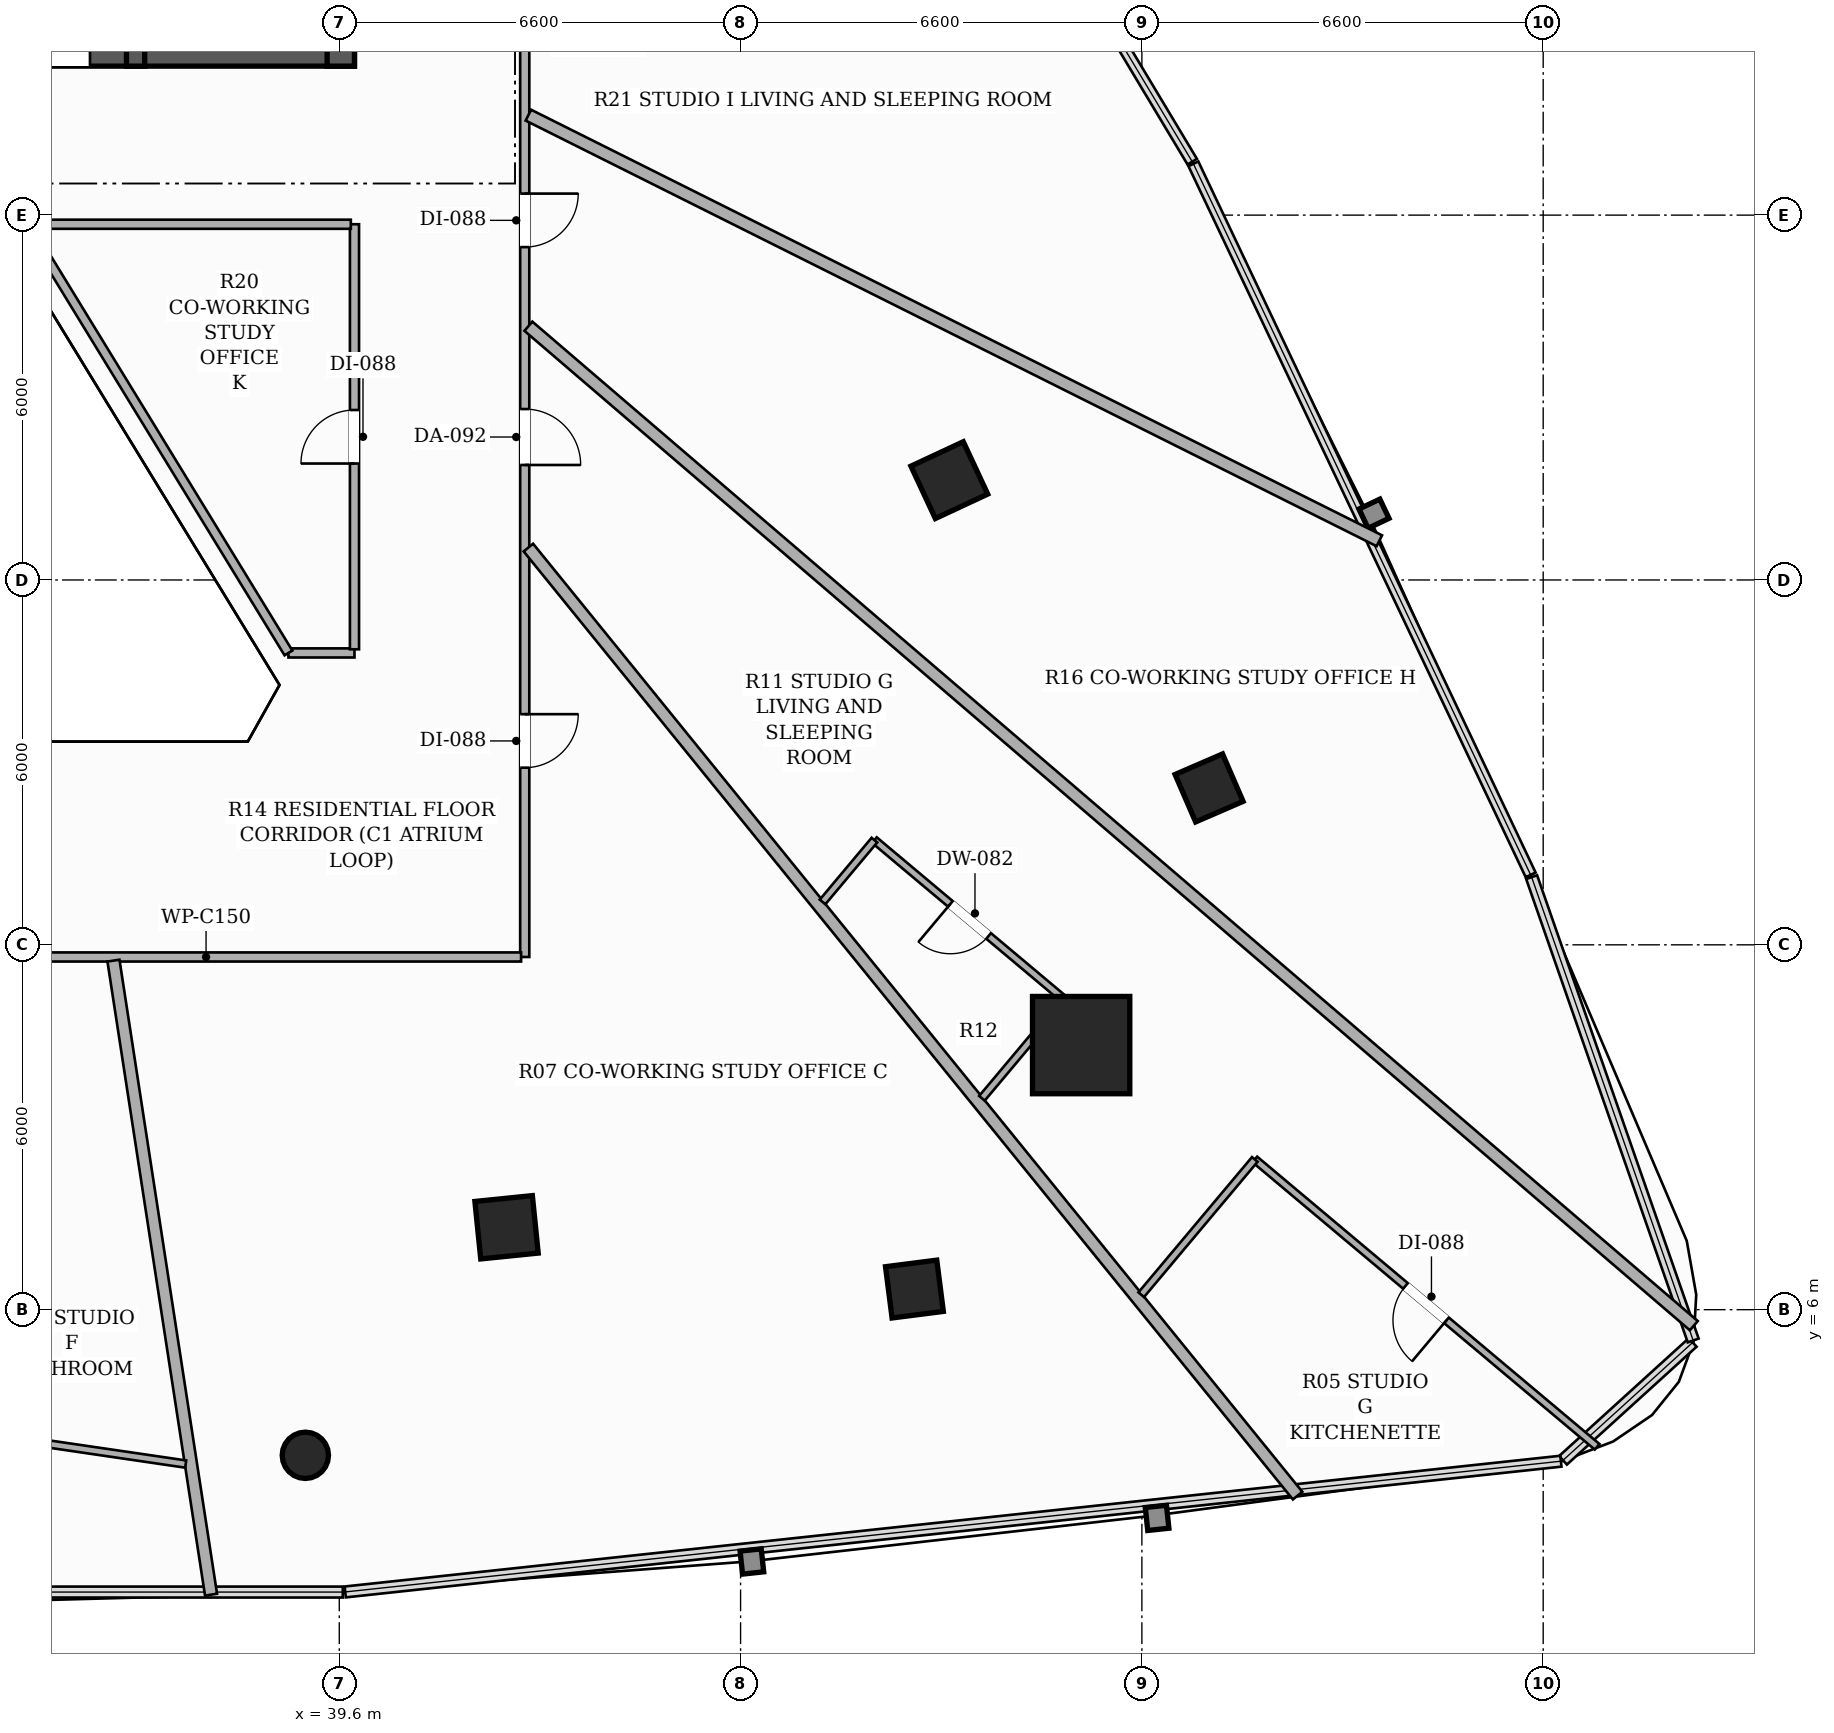
"""IFC4 building model, lengths in metres.
Left out: names, types, materials, properties, quantities, classifications, styles, units other than length and angle.
Written with IfcOpenShell. Run it as: python <this file> out.ifc"""

import sys

from ifc_helpers import new_model, si_unit, direction, frame, frame_2d, origin, origin_2d, place, context, subcontext, project, spatial, rectangle, hollow_rectangle, hollow_circle, extrude, element, fill, save


model = new_model("IFC4")
c1 = context("Model", 3, precision=1e-05, world=origin(), true_north=direction((0.0, 1.0)))
c2 = subcontext(c1, "Body", "Model", "MODEL_VIEW")
j1 = project(units=[si_unit("LENGTHUNIT", "METRE"), si_unit("PLANEANGLEUNIT", "RADIAN")], contexts=[c1])
p1 = place(None, origin())
s1 = spatial("IfcSite", under=j1, at=p1, CompositionType="ELEMENT")
p2 = place(p1, origin())
s2 = spatial("IfcBuilding", under=s1, at=p2, CompositionType="ELEMENT")
p3 = place(p2, frame((0.0, 0.0, 40.1)))
s3 = spatial("IfcBuildingStorey", under=s2, at=p3, CompositionType="ELEMENT", Elevation=40.1)
p4 = place(p3, frame((26.15, 26.675, 0.0), z_axis=(0.0, 0.0, 1.0), x_axis=(1.0, 0.0, 0.0)))
e1 = element("IfcWall", 1, at=p4, inside=s3, PredefinedType="SHEAR", context=c2, shape_type="SweptSolid", body=[
    extrude(rectangle(XDim=13.7, YDim=0.45, at=frame_2d((6.85, 0.0))), origin(), (0.0, 0.0, 1.0), 3.3),
])
p5 = place(p4, frame((4.35, 0.0, 0.0)))
e2 = element("IfcOpeningElement", 2, at=p5, cuts=e1, PredefinedType="OPENING", context=c2, shape_type="SweptSolid", body=[
    extrude(rectangle(XDim=1.05, YDim=2.15, at=frame_2d((0.525, 1.075))), frame((0.0, 0.235, 0.0), z_axis=(0.0, -1.0, 0.0), x_axis=(1.0, 0.0, 0.0)), (0.0, 0.0, 1.0), 0.47),
])
p6 = place(p4, frame((8.3, 0.0, 0.0)))
e3 = element("IfcOpeningElement", 3, at=p6, cuts=e1, PredefinedType="OPENING", context=c2, shape_type="SweptSolid", body=[
    extrude(rectangle(XDim=1.05, YDim=2.15, at=frame_2d((0.525, 1.075))), frame((0.0, 0.235, 0.0), z_axis=(0.0, -1.0, 0.0), x_axis=(1.0, 0.0, 0.0)), (0.0, 0.0, 1.0), 0.47),
])
p7 = place(p3, frame((39.625, 26.45, 0.0), z_axis=(0.0, 0.0, 1.0), x_axis=(0.0, 1.0, 0.0)))
e4 = element("IfcWall", 4, at=p7, inside=s3, PredefinedType="SHEAR", context=c2, shape_type="SweptSolid", body=[
    extrude(rectangle(XDim=7.7, YDim=0.45, at=frame_2d((3.85, 0.0))), origin(), (0.0, 0.0, 1.0), 3.3),
])
p8 = place(p3, frame((36.25, 26.45, 0.0), z_axis=(0.0, 0.0, 1.0), x_axis=(0.0, 1.0, 0.0)))
e5 = element("IfcWall", 5, at=p8, inside=s3, PredefinedType="SHEAR", context=c2, shape_type="SweptSolid", body=[
    extrude(rectangle(XDim=8.2, YDim=0.3, at=frame_2d((4.1, 0.0))), origin(), (0.0, 0.0, 1.0), 3.3),
])
p9 = place(p8, frame((0.6, 0.0, 0.0)))
e6 = element("IfcOpeningElement", 6, at=p9, cuts=e5, PredefinedType="OPENING", context=c2, shape_type="SweptSolid", body=[
    extrude(rectangle(XDim=1.05, YDim=2.15, at=frame_2d((0.525, 1.075))), frame((0.0, 0.16, 0.0), z_axis=(0.0, -1.0, 0.0), x_axis=(1.0, 0.0, 0.0)), (0.0, 0.0, 1.0), 0.32),
])
p10 = place(p3, frame((51.801, 10.351, 0.0), z_axis=(0.0, 0.0, 1.0), x_axis=(1.0, 0.0, 0.0)))
e7 = element("IfcColumn", 7, at=p10, inside=s3, PredefinedType="COLUMN", context=c2, shape_type="SweptSolid", body=[
    extrude(hollow_rectangle(XDim=1.6, YDim=1.6, WallThickness=0.05, at=origin_2d()), origin(), (0.0, 0.0, 1.0), 3.3),
])
for number, where, z_axis, x_axis in (
    (8, (42.351, 7.355, 0.0), (0.0, 0.0, 1.0), (0.995, 0.101, 0.0)),
    (9, (49.633, 19.642, 0.0), (0.0, 0.0, 1.0), (-0.423, 0.906, 0.0)),
):
    element("IfcColumn", number, at=place(p3, frame(where, z_axis=z_axis, x_axis=x_axis)), inside=s3, PredefinedType="COLUMN", context=c2, shape_type="SweptSolid", body=[
        extrude(hollow_rectangle(XDim=0.95, YDim=0.95, WallThickness=0.032, at=origin_2d()), origin(), (0.0, 0.0, 1.0), 3.3),
    ])
for number, where, z_axis, x_axis in (
    (10, (49.059, 6.339, 0.0), (0.0, 0.0, 1.0), (0.992, 0.127, 0.0)),
    (11, (53.905, 14.58, 0.0), (0.0, 0.0, 1.0), (-0.397, 0.918, 0.0)),
):
    element("IfcColumn", number, at=place(p3, frame(where, z_axis=z_axis, x_axis=x_axis)), inside=s3, PredefinedType="COLUMN", context=c2, shape_type="SweptSolid", body=[
        extrude(hollow_rectangle(XDim=0.85, YDim=0.85, WallThickness=0.028, at=origin_2d()), origin(), (0.0, 0.0, 1.0), 3.3),
    ])
p11 = place(p3, frame((39.042, 3.605, 0.0), z_axis=(0.0, 0.0, 1.0), x_axis=(1.0, 0.0, 0.0)))
e12 = element("IfcColumn", 12, at=p11, inside=s3, PredefinedType="COLUMN", context=c2, shape_type="SweptSolid", body=[
    extrude(hollow_circle(Radius=0.381, WallThickness=0.022, at=origin_2d()), origin(), (0.0, 0.0, 1.0), 3.3),
])
p12 = place(p3, frame((42.65, 36.84, 0.0), z_axis=(0.0, 0.0, 1.0), x_axis=(0.0, -1.0, 0.0)))
e13 = element("IfcWall", 13, at=p12, inside=s3, PredefinedType="PARTITIONING", context=c2, shape_type="SweptSolid", body=[
    extrude(rectangle(XDim=25.04, YDim=0.15, at=frame_2d((12.52, 0.0))), origin(), (0.0, 0.0, 1.0), 2.413),
])
p13 = place(p12, frame((1.219, 0.0, 0.0)))
e14 = element("IfcOpeningElement", 14, at=p13, cuts=e13, PredefinedType="OPENING", context=c2, shape_type="SweptSolid", body=[
    extrude(rectangle(XDim=0.88, YDim=2.1, at=frame_2d((0.44, 1.05))), frame((0.0, 0.085, 0.0), z_axis=(0.0, -1.0, 0.0), x_axis=(1.0, 0.0, 0.0)), (0.0, 0.0, 1.0), 0.17),
])
p14 = place(p12, frame((21.047, 0.0, 0.0)))
e15 = element("IfcOpeningElement", 15, at=p14, cuts=e13, PredefinedType="OPENING", context=c2, shape_type="SweptSolid", body=[
    extrude(rectangle(XDim=0.88, YDim=2.1, at=frame_2d((0.44, 1.05))), frame((0.0, 0.085, 0.0), z_axis=(0.0, -1.0, 0.0), x_axis=(1.0, 0.0, 0.0)), (0.0, 0.0, 1.0), 0.17),
])
p15 = place(p12, frame((16.029, 0.0, 0.0)))
e16 = element("IfcOpeningElement", 16, at=p15, cuts=e13, PredefinedType="OPENING", context=c2, shape_type="SweptSolid", body=[
    extrude(rectangle(XDim=0.92, YDim=2.15, at=frame_2d((0.46, 1.075))), frame((0.0, 0.085, 0.0), z_axis=(0.0, -1.0, 0.0), x_axis=(1.0, 0.0, 0.0)), (0.0, 0.0, 1.0), 0.17),
])
p16 = place(p12, frame((12.486, 0.0, 0.0)))
e17 = element("IfcOpeningElement", 17, at=p16, cuts=e13, PredefinedType="OPENING", context=c2, shape_type="SweptSolid", body=[
    extrude(rectangle(XDim=0.88, YDim=2.1, at=frame_2d((0.44, 1.05))), frame((0.0, 0.085, 0.0), z_axis=(0.0, -1.0, 0.0), x_axis=(1.0, 0.0, 0.0)), (0.0, 0.0, 1.0), 0.17),
])
p17 = place(p12, frame((6.638, 0.0, 0.0)))
e18 = element("IfcOpeningElement", 18, at=p17, cuts=e13, PredefinedType="OPENING", context=c2, shape_type="SweptSolid", body=[
    extrude(rectangle(XDim=0.92, YDim=2.15, at=frame_2d((0.46, 1.075))), frame((0.0, 0.085, 0.0), z_axis=(0.0, -1.0, 0.0), x_axis=(1.0, 0.0, 0.0)), (0.0, 0.0, 1.0), 0.17),
])
p18 = place(p3, frame((42.59, 11.8, 0.0), z_axis=(0.0, 0.0, 1.0), x_axis=(-1.0, 0.0, 0.0)))
e19 = element("IfcWall", 19, at=p18, inside=s3, PredefinedType="PARTITIONING", context=c2, shape_type="SweptSolid", body=[
    extrude(rectangle(XDim=19.24, YDim=0.15, at=frame_2d((9.62, 0.0))), origin(), (0.0, 0.0, 1.0), 2.669),
])
p19 = place(p18, frame((10.462, 0.0, 0.0)))
e20 = element("IfcOpeningElement", 20, at=p19, cuts=e19, PredefinedType="OPENING", context=c2, shape_type="SweptSolid", body=[
    extrude(rectangle(XDim=0.92, YDim=2.15, at=frame_2d((0.46, 1.075))), frame((0.0, 0.085, 0.0), z_axis=(0.0, -1.0, 0.0), x_axis=(1.0, 0.0, 0.0)), (0.0, 0.0, 1.0), 0.17),
])
p20 = place(p3, frame((38.764, 16.8, 0.0), z_axis=(0.0, 0.0, 1.0), x_axis=(1.0, 0.0, 0.0)))
e21 = element("IfcWall", 21, at=p20, inside=s3, PredefinedType="PARTITIONING", context=c2, shape_type="SweptSolid", body=[
    extrude(rectangle(XDim=1.086, YDim=0.15, at=frame_2d((0.543, 0.0))), origin(), (0.0, 0.0, 1.0), 3.06),
])
p21 = place(p3, frame((39.85, 16.86, 0.0), z_axis=(0.0, 0.0, 1.0), x_axis=(0.0, 1.0, 0.0)))
e22 = element("IfcWall", 22, at=p21, inside=s3, PredefinedType="PARTITIONING", context=c2, shape_type="SweptSolid", body=[
    extrude(rectangle(XDim=6.99, YDim=0.15, at=frame_2d((3.495, 0.0))), origin(), (0.0, 0.0, 1.0), 2.669),
])
p22 = place(p21, frame((3.055, 0.0, 0.0)))
e23 = element("IfcOpeningElement", 23, at=p22, cuts=e22, PredefinedType="OPENING", context=c2, shape_type="SweptSolid", body=[
    extrude(rectangle(XDim=0.88, YDim=2.1, at=frame_2d((0.44, 1.05))), frame((0.0, 0.085, 0.0), z_axis=(0.0, -1.0, 0.0), x_axis=(1.0, 0.0, 0.0)), (0.0, 0.0, 1.0), 0.17),
])
p23 = place(p3, frame((39.79, 23.85, 0.0), z_axis=(0.0, 0.0, 1.0), x_axis=(-1.0, 0.0, 0.0)))
e24 = element("IfcWall", 24, at=p23, inside=s3, PredefinedType="PARTITIONING", context=c2, shape_type="SweptSolid", body=[
    extrude(rectangle(XDim=5.335, YDim=0.15, at=frame_2d((2.667, 0.0))), origin(), (0.0, 0.0, 1.0), 2.669),
])
p24 = place(p3, frame((34.486, 23.79, 0.0), z_axis=(0.0, 0.0, 1.0), x_axis=(0.521998190399, -0.852946592244, 0.0)))
e25 = element("IfcWall", 25, at=p24, inside=s3, PredefinedType="PARTITIONING", context=c2, shape_type="SweptSolid", body=[
    extrude(rectangle(XDim=8.195, YDim=0.15, at=frame_2d((4.098, 0.0))), origin(), (0.0, 0.0, 1.0), 2.669),
])
p25 = place(p3, frame((37.491, 1.313, 0.0), z_axis=(0.0, 0.0, 1.0), x_axis=(-0.152133698634, 0.988359923176, 0.0)))
e26 = element("IfcWall", 26, at=p25, inside=s3, PredefinedType="PARTITIONING", context=c2, shape_type="SweptSolid", body=[
    extrude(rectangle(XDim=10.55, YDim=0.2, at=frame_2d((5.275, 0.0))), origin(), (0.0, 0.0, 1.0), 2.413),
])
p26 = place(p3, frame((42.71, 18.533, 0.0), z_axis=(0.0, 0.0, 1.0), x_axis=(0.630093983448, -0.776518880661, 0.0)))
e27 = element("IfcWall", 27, at=p26, inside=s3, PredefinedType="PARTITIONING", context=c2, shape_type="SweptSolid", body=[
    extrude(rectangle(XDim=20.078, YDim=0.2, at=frame_2d((10.039, 0.0))), origin(), (0.0, 0.0, 1.0), 2.413),
])
p27 = place(p3, frame((42.71, 22.173, 0.0), z_axis=(0.0, 0.0, 1.0), x_axis=(0.759115981911, -0.650955394791, 0.0)))
e28 = element("IfcWall", 28, at=p27, inside=s3, PredefinedType="PARTITIONING", context=c2, shape_type="SweptSolid", body=[
    extrude(rectangle(XDim=25.249, YDim=0.2, at=frame_2d((12.625, 0.0))), origin(), (0.0, 0.0, 1.0), 2.413),
])
p28 = place(p3, frame((42.71, 25.644, 0.0), z_axis=(0.0, 0.0, 1.0), x_axis=(0.894389742198, -0.447288485265, 0.0)))
e29 = element("IfcWall", 29, at=p28, inside=s3, PredefinedType="PARTITIONING", context=c2, shape_type="SweptSolid", body=[
    extrude(rectangle(XDim=15.648, YDim=0.2, at=frame_2d((7.824, 0.0))), origin(), (0.0, 0.0, 1.0), 2.413),
])
p29 = place(p3, frame((33.321, 4.011, 0.0), z_axis=(0.0, 0.0, 1.0), x_axis=(0.98942932615, -0.145015890698, 0.0)))
e30 = element("IfcWall", 30, at=p29, inside=s3, PredefinedType="PARTITIONING", context=c2, shape_type="SweptSolid", body=[
    extrude(rectangle(XDim=3.793, YDim=0.12, at=frame_2d((1.896, 0.0))), origin(), (0.0, 0.0, 1.0), 3.06),
])
p30 = place(p3, frame((50.169, 9.476, 0.0), z_axis=(0.0, 0.0, 1.0), x_axis=(0.642802339764, 0.766032082875, 0.0)))
e31 = element("IfcWall", 31, at=p30, inside=s3, PredefinedType="PARTITIONING", context=c2, shape_type="SweptSolid", body=[
    extrude(rectangle(XDim=2.116, YDim=0.12, at=frame_2d((1.058, 0.0))), origin(), (0.0, 0.0, 1.0), 2.413),
])
p31 = place(p3, frame((51.529, 11.097, 0.0), z_axis=(0.0, 0.0, 1.0), x_axis=(-0.766026296222, 0.642809235696, 0.0)))
e32 = element("IfcWall", 32, at=p31, inside=s3, PredefinedType="PARTITIONING", context=c2, shape_type="SweptSolid", body=[
    extrude(rectangle(XDim=4.084, YDim=0.12, at=frame_2d((2.042, 0.0))), origin(), (0.0, 0.0, 1.0), 2.413),
])
p32 = place(p31, frame((1.632, 0.0, 0.0)))
e33 = element("IfcOpeningElement", 33, at=p32, cuts=e32, PredefinedType="OPENING", context=c2, shape_type="SweptSolid", body=[
    extrude(rectangle(XDim=0.82, YDim=2.1, at=frame_2d((0.41, 1.05))), frame((0.0, 0.07, 0.0), z_axis=(0.0, -1.0, 0.0), x_axis=(1.0, 0.0, 0.0)), (0.0, 0.0, 1.0), 0.14),
])
p33 = place(p3, frame((48.401, 13.722, 0.0), z_axis=(0.0, 0.0, 1.0), x_axis=(-0.642587875402, -0.76621199572, 0.0)))
e34 = element("IfcWall", 34, at=p33, inside=s3, PredefinedType="PARTITIONING", context=c2, shape_type="SweptSolid", body=[
    extrude(rectangle(XDim=1.327, YDim=0.12, at=frame_2d((0.664, 0.0))), origin(), (0.0, 0.0, 1.0), 3.06),
])
p34 = place(p3, frame((60.287, 3.745, 0.0), z_axis=(0.0, 0.0, 1.0), x_axis=(-0.765937745649, 0.642914745351, 0.0)))
e35 = element("IfcWall", 35, at=p34, inside=s3, PredefinedType="PARTITIONING", context=c2, shape_type="SweptSolid", body=[
    extrude(rectangle(XDim=7.351, YDim=0.12, at=frame_2d((3.675, 0.0))), origin(), (0.0, 0.0, 1.0), 2.619),
])
p35 = place(p34, frame((3.235, 0.0, 0.0)))
e36 = element("IfcOpeningElement", 36, at=p35, cuts=e35, PredefinedType="OPENING", context=c2, shape_type="SweptSolid", body=[
    extrude(rectangle(XDim=0.88, YDim=2.1, at=frame_2d((0.44, 1.05))), frame((0.0, 0.07, 0.0), z_axis=(0.0, -1.0, 0.0), x_axis=(1.0, 0.0, 0.0)), (0.0, 0.0, 1.0), 0.14),
])
p36 = place(p3, frame((54.657, 8.471, 0.0), z_axis=(0.0, 0.0, 1.0), x_axis=(-0.6429989132, -0.765867088746, 0.0)))
e37 = element("IfcWall", 37, at=p36, inside=s3, PredefinedType="PARTITIONING", context=c2, shape_type="SweptSolid", body=[
    extrude(rectangle(XDim=2.905, YDim=0.12, at=frame_2d((1.453, 0.0))), origin(), (0.0, 0.0, 1.0), 3.06),
])
p37 = place(p6, origin())
e38 = element("IfcDoor", 38, at=p37, inside=s3, OperationType="SINGLE_SWING_RIGHT", PredefinedType="DOOR", context=c2, shape_type="SweptSolid", body=[
    extrude(rectangle(XDim=1.05, YDim=2.15, at=frame_2d((0.525, 1.075))), frame((0.0, 0.025, 0.0), z_axis=(0.0, -1.0, 0.0), x_axis=(1.0, 0.0, 0.0)), (0.0, 0.0, 1.0), 0.05),
])
fill(e3, e38)
p38 = place(p14, origin())
e39 = element("IfcDoor", 39, at=p38, inside=s3, OperationType="SINGLE_SWING_LEFT", PredefinedType="DOOR", context=c2, shape_type="SweptSolid", body=[
    extrude(rectangle(XDim=0.88, YDim=2.1, at=frame_2d((0.44, 1.05))), frame((0.0, 0.025, 0.0), z_axis=(0.0, -1.0, 0.0), x_axis=(1.0, 0.0, 0.0)), (0.0, 0.0, 1.0), 0.05),
])
fill(e15, e39)
p39 = place(p15, origin())
e40 = element("IfcDoor", 40, at=p39, inside=s3, OperationType="SINGLE_SWING_RIGHT", PredefinedType="DOOR", context=c2, shape_type="SweptSolid", body=[
    extrude(rectangle(XDim=0.92, YDim=2.15, at=frame_2d((0.46, 1.075))), frame((0.0, 0.025, 0.0), z_axis=(0.0, -1.0, 0.0), x_axis=(1.0, 0.0, 0.0)), (0.0, 0.0, 1.0), 0.05),
])
fill(e16, e40)
p40 = place(p32, origin())
e41 = element("IfcDoor", 41, at=p40, inside=s3, OperationType="SINGLE_SWING_RIGHT", PredefinedType="DOOR", context=c2, shape_type="SweptSolid", body=[
    extrude(rectangle(XDim=0.82, YDim=2.1, at=frame_2d((0.41, 1.05))), frame((0.0, 0.025, 0.0), z_axis=(0.0, -1.0, 0.0), x_axis=(1.0, 0.0, 0.0)), (0.0, 0.0, 1.0), 0.05),
])
fill(e33, e41)
p41 = place(p35, origin())
e42 = element("IfcDoor", 42, at=p41, inside=s3, OperationType="SINGLE_SWING_LEFT", PredefinedType="DOOR", context=c2, shape_type="SweptSolid", body=[
    extrude(rectangle(XDim=0.88, YDim=2.1, at=frame_2d((0.44, 1.05))), frame((0.0, 0.025, 0.0), z_axis=(0.0, -1.0, 0.0), x_axis=(1.0, 0.0, 0.0)), (0.0, 0.0, 1.0), 0.05),
])
fill(e36, e42)
p42 = place(p16, origin())
e43 = element("IfcDoor", 43, at=p42, inside=s3, OperationType="SINGLE_SWING_LEFT", PredefinedType="DOOR", context=c2, shape_type="SweptSolid", body=[
    extrude(rectangle(XDim=0.88, YDim=2.1, at=frame_2d((0.44, 1.05))), frame((0.0, 0.025, 0.0), z_axis=(0.0, -1.0, 0.0), x_axis=(1.0, 0.0, 0.0)), (0.0, 0.0, 1.0), 0.05),
])
fill(e17, e43)
p43 = place(p22, origin())
e44 = element("IfcDoor", 44, at=p43, inside=s3, OperationType="SINGLE_SWING_LEFT", PredefinedType="DOOR", context=c2, shape_type="SweptSolid", body=[
    extrude(rectangle(XDim=0.88, YDim=2.1, at=frame_2d((0.44, 1.05))), frame((0.0, 0.025, 0.0), z_axis=(0.0, -1.0, 0.0), x_axis=(1.0, 0.0, 0.0)), (0.0, 0.0, 1.0), 0.05),
])
fill(e23, e44)
save(model, sys.argv[1])
